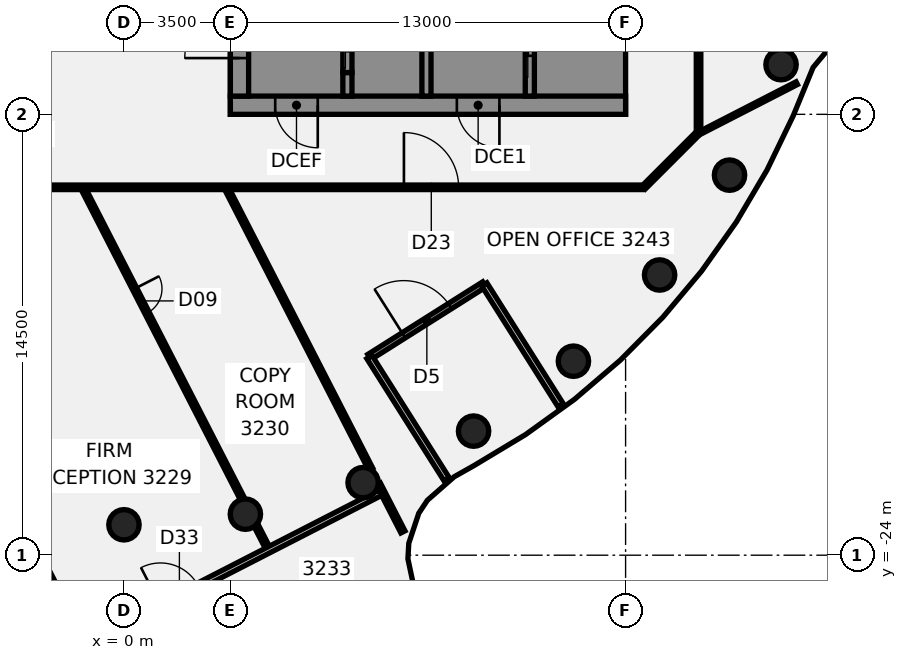
"""IFC4 building model, lengths in metres.
Left out: names, types, materials, properties, quantities, classifications, styles, units other than length and angle.
Written with IfcOpenShell. Run it as: python <this file> out.ifc"""

import sys

from ifc_helpers import new_model, si_unit, direction, frame, frame_2d, origin, origin_2d, place, context, subcontext, project, spatial, polyline, rectangle, circle, outline, extrude, element, fill, save


model = new_model("IFC4")
c1 = context("Model", 3, precision=1e-05, world=origin(), true_north=direction((0.0, 1.0)))
c2 = subcontext(c1, "Body", "Model", "MODEL_VIEW")
j1 = project(units=[si_unit("LENGTHUNIT", "METRE"), si_unit("PLANEANGLEUNIT", "RADIAN")], contexts=[c1])
p1 = place(None, origin())
s1 = spatial("IfcSite", under=j1, at=p1, CompositionType="ELEMENT")
p2 = place(p1, origin())
s2 = spatial("IfcBuilding", under=s1, at=p2, CompositionType="ELEMENT")
p3 = place(p2, frame((0.0, 0.0, 133.0)))
s3 = spatial("IfcBuildingStorey", under=s2, at=p3, CompositionType="ELEMENT", Elevation=133.0)
for number, where, z_axis, x_axis in (
    (1, (0.0, -23.0, -0.14), (0.0, 0.0, 1.0), (1.0, 0.0, 0.0)),
    (2, (3.994, -22.651, -0.14), (0.0, 0.0, 1.0), (1.0, 0.0, 0.0)),
    (3, (7.866, -21.613, -0.14), (0.0, 0.0, 1.0), (1.0, 0.0, 0.0)),
    (4, (11.5, -19.919, -0.14), (0.0, 0.0, 1.0), (1.0, 0.0, 0.0)),
    (5, (14.784, -17.619, -0.14), (0.0, 0.0, 1.0), (1.0, 0.0, 0.0)),
    (6, (17.619, -14.784, -0.14), (0.0, 0.0, 1.0), (1.0, 0.0, 0.0)),
    (7, (19.919, -11.5, -0.14), (0.0, 0.0, 1.0), (1.0, 0.0, 0.0)),
    (8, (21.613, -7.866, -0.14), (0.0, 0.0, 1.0), (1.0, 0.0, 0.0)),
):
    element("IfcColumn", number, at=place(p3, frame(where, z_axis=z_axis, x_axis=x_axis)), inside=s3, PredefinedType="COLUMN", context=c2, shape_type="SweptSolid", body=[
        extrude(circle(Radius=0.5, at=origin_2d()), origin(), (0.0, 0.0, 1.0), 3.75),
    ])
p4 = place(p3, frame((-3.485, -22.655, 0.0), z_axis=(0.0, 0.0, 1.0), x_axis=(0.456522971759, -0.889711625335, 0.0)))
e9 = element("IfcWall", 9, at=p4, inside=s3, PredefinedType="PARTITIONING", context=c2, shape_type="SweptSolid", body=[
    extrude(rectangle(XDim=4.708, YDim=0.15, at=frame_2d((2.354, 0.0))), origin(), (0.0, 0.0, 1.0), 3.01),
])
p5 = place(p3, frame((-1.313, -11.993, 0.0), z_axis=(0.0, 0.0, 1.0), x_axis=(0.456517816725, -0.889714270433, 0.0)))
e10 = element("IfcWall", 10, at=p5, inside=s3, PredefinedType="PARTITIONING", context=c2, shape_type="SweptSolid", body=[
    extrude(rectangle(XDim=11.432, YDim=0.15, at=frame_2d((5.716, 0.0))), origin(), (0.0, 0.0, 1.0), 3.01),
])
p6 = place(p5, frame((3.645, 0.0, 0.0)))
e11 = element("IfcOpeningElement", 11, at=p6, cuts=e10, PredefinedType="OPENING", context=c2, shape_type="SweptSolid", body=[
    extrude(rectangle(XDim=0.9, YDim=2.1, at=frame_2d((0.45, 1.05))), frame((0.0, 0.085, 0.0), z_axis=(0.0, -1.0, 0.0), x_axis=(1.0, 0.0, 0.0)), (0.0, 0.0, 1.0), 0.17),
])
p7 = place(p3, frame((4.337, -23.004, 0.0), z_axis=(0.0, 0.0, 1.0), x_axis=(0.456575953503, -0.889684437698, 0.0)))
e12 = element("IfcWall", 12, at=p7, inside=s3, PredefinedType="PARTITIONING", context=c2, shape_type="SweptSolid", body=[
    extrude(rectangle(XDim=0.822, YDim=0.15, at=frame_2d((0.411, 0.0))), origin(), (0.0, 0.0, 1.0), 3.01),
])
p8 = place(p3, frame((3.407, -11.993, 0.0), z_axis=(0.0, 0.0, 1.0), x_axis=(0.456609270215, -0.889667339152, 0.0)))
e13 = element("IfcWall", 13, at=p8, inside=s3, PredefinedType="PARTITIONING", context=c2, shape_type="SweptSolid", body=[
    extrude(rectangle(XDim=10.314, YDim=0.15, at=frame_2d((5.157, 0.0))), origin(), (0.0, 0.0, 1.0), 3.01),
])
p9 = place(p3, frame((8.365, -21.655, 0.0), z_axis=(0.0, 0.0, 1.0), x_axis=(0.456704681847, -0.889618364007, 0.0)))
e14 = element("IfcWall", 14, at=p9, inside=s3, PredefinedType="PARTITIONING", context=c2, shape_type="SweptSolid", body=[
    extrude(rectangle(XDim=1.775, YDim=0.15, at=frame_2d((0.888, 0.0))), origin(), (0.0, 0.0, 1.0), 3.01),
])
p10 = place(p3, frame((-17.1, -11.9, 0.0), z_axis=(0.0, 0.0, 1.0), x_axis=(1.0, 0.0, 0.0)))
e15 = element("IfcWall", 15, at=p10, inside=s3, PredefinedType="PARTITIONING", context=c2, shape_type="SweptSolid", body=[
    extrude(rectangle(XDim=34.165, YDim=0.15, at=frame_2d((17.083, 0.0))), origin(), (0.0, 0.0, 1.0), 3.01),
])
p11 = place(p10, frame((10.946, 0.0, 0.0)))
e16 = element("IfcOpeningElement", 16, at=p11, cuts=e15, PredefinedType="OPENING", context=c2, shape_type="SweptSolid", body=[
    extrude(rectangle(XDim=1.8, YDim=2.1, at=frame_2d((0.9, 1.05))), frame((0.0, 0.085, 0.0), z_axis=(0.0, -1.0, 0.0), x_axis=(1.0, 0.0, 0.0)), (0.0, 0.0, 1.0), 0.17),
])
p12 = place(p10, frame((1.65, 0.0, 0.0)))
e17 = element("IfcOpeningElement", 17, at=p12, cuts=e15, PredefinedType="OPENING", context=c2, shape_type="SweptSolid", body=[
    extrude(rectangle(XDim=1.8, YDim=2.1, at=frame_2d((0.9, 1.05))), frame((0.0, 0.085, 0.0), z_axis=(0.0, -1.0, 0.0), x_axis=(1.0, 0.0, 0.0)), (0.0, 0.0, 1.0), 0.17),
])
p13 = place(p10, frame((26.309, 0.0, 0.0)))
e18 = element("IfcOpeningElement", 18, at=p13, cuts=e15, PredefinedType="OPENING", context=c2, shape_type="SweptSolid", body=[
    extrude(rectangle(XDim=1.8, YDim=2.1, at=frame_2d((0.9, 1.05))), frame((0.0, 0.085, 0.0), z_axis=(0.0, -1.0, 0.0), x_axis=(1.0, 0.0, 0.0)), (0.0, 0.0, 1.0), 0.17),
])
p14 = place(p3, frame((-4.225, -28.439, 0.0), z_axis=(0.0, 0.0, 1.0), x_axis=(0.889694266908, 0.456556799787, 0.0)))
e19 = element("IfcWall", 19, at=p14, inside=s3, PredefinedType="PARTITIONING", context=c2, shape_type="SweptSolid", body=[
    extrude(rectangle(XDim=14.219, YDim=0.2, at=frame_2d((7.11, 0.0))), origin(), (0.0, 0.0, 1.0), 3.01),
])
p15 = place(p14, frame((6.099, 0.0, 0.0)))
e20 = element("IfcOpeningElement", 20, at=p15, cuts=e19, PredefinedType="OPENING", context=c2, shape_type="SweptSolid", body=[
    extrude(rectangle(XDim=1.4, YDim=2.1, at=frame_2d((0.7, 1.05))), frame((0.0, 0.11, 0.0), z_axis=(0.0, -1.0, 0.0), x_axis=(1.0, 0.0, 0.0)), (0.0, 0.0, 1.0), 0.22),
])
p16 = place(p3, frame((18.93, -10.118, 0.0), z_axis=(0.0, 0.0, 1.0), x_axis=(0.889666890189, 0.456610144984, 0.0)))
e21 = element("IfcWall", 21, at=p16, inside=s3, PredefinedType="PARTITIONING", context=c2, shape_type="SweptSolid", body=[
    extrude(rectangle(XDim=3.597, YDim=0.1, at=frame_2d((1.798, 0.0))), origin(), (0.0, 0.0, 1.0), 3.01),
])
p17 = place(p3, frame((17.1, -11.9, 0.0), z_axis=(0.0, 0.0, 1.0), x_axis=(0.707106781187, 0.707106781187, 0.0)))
e22 = element("IfcWall", 22, at=p17, inside=s3, PredefinedType="PARTITIONING", context=c2, shape_type="SweptSolid", body=[
    extrude(rectangle(XDim=2.505, YDim=0.15, at=frame_2d((1.253, 0.0))), origin(), (0.0, 0.0, 1.0), 3.01),
])
p18 = place(p3, frame((18.9, -10.1, 0.0), z_axis=(0.0, 0.0, 1.0), x_axis=(0.0, 1.0, 0.0)))
e23 = element("IfcWall", 23, at=p18, inside=s3, PredefinedType="PARTITIONING", context=c2, shape_type="SweptSolid", body=[
    extrude(rectangle(XDim=20.2, YDim=0.15, at=frame_2d((10.1, 0.0))), origin(), (0.0, 0.0, 1.0), 3.01),
])
p19 = place(p18, frame((8.438, 0.0, 0.0)))
e24 = element("IfcOpeningElement", 24, at=p19, cuts=e23, PredefinedType="OPENING", context=c2, shape_type="SweptSolid", body=[
    extrude(rectangle(XDim=1.8, YDim=2.1, at=frame_2d((0.9, 1.05))), frame((0.0, 0.085, 0.0), z_axis=(0.0, -1.0, 0.0), x_axis=(1.0, 0.0, 0.0)), (0.0, 0.0, 1.0), 0.17),
])
p20 = place(p18, frame((13.681, 0.0, 0.0)))
e25 = element("IfcOpeningElement", 25, at=p20, cuts=e23, PredefinedType="OPENING", context=c2, shape_type="SweptSolid", body=[
    extrude(rectangle(XDim=0.9, YDim=2.1, at=frame_2d((0.45, 1.05))), frame((0.0, 0.085, 0.0), z_axis=(0.0, -1.0, 0.0), x_axis=(1.0, 0.0, 0.0)), (0.0, 0.0, 1.0), 0.17),
])
p21 = place(p3, frame((8.073, -17.482, 0.0), z_axis=(0.0, 0.0, 1.0), x_axis=(0.845417528595, 0.534105984187, 0.0)))
e26 = element("IfcWall", 26, at=p21, inside=s3, PredefinedType="SOLIDWALL", context=c2, shape_type="SweptSolid", body=[
    extrude(rectangle(XDim=4.471, YDim=0.2, at=frame_2d((2.235, 0.0))), origin(), (0.0, 0.0, 1.0), 3.61),
])
p22 = place(p21, frame((1.335, 0.0, 0.0)))
e27 = element("IfcOpeningElement", 27, at=p22, cuts=e26, PredefinedType="OPENING", context=c2, shape_type="SweptSolid", body=[
    extrude(rectangle(XDim=1.8, YDim=2.4, at=frame_2d((0.9, 1.2))), frame((0.0, 0.11, 0.0), z_axis=(0.0, -1.0, 0.0), x_axis=(1.0, 0.0, 0.0)), (0.0, 0.0, 1.0), 0.22),
])
p23 = place(p3, frame((8.073, -17.482, 0.0), z_axis=(0.0, 0.0, 1.0), x_axis=(0.534101065581, -0.845420635982, 0.0)))
e28 = element("IfcWall", 28, at=p23, inside=s3, PredefinedType="SOLIDWALL", context=c2, shape_type="SweptSolid", body=[
    extrude(rectangle(XDim=4.759, YDim=0.2, at=frame_2d((2.38, 0.0))), origin(), (0.0, 0.0, 1.0), 3.61),
])
p24 = place(p3, frame((11.853, -15.094, 0.0), z_axis=(0.0, 0.0, 1.0), x_axis=(0.534084671669, -0.845430992742, 0.0)))
e29 = element("IfcWall", 29, at=p24, inside=s3, PredefinedType="SOLIDWALL", context=c2, shape_type="SweptSolid", body=[
    extrude(rectangle(XDim=4.709, YDim=0.2, at=frame_2d((2.354, 0.0))), origin(), (0.0, 0.0, 1.0), 3.61),
])
p25 = place(p3, frame((16.5, -9.2, 0.0), z_axis=(0.0, 0.0, 1.0), x_axis=(-1.0, 0.0, 0.0)))
e30 = element("IfcWall", 30, at=p25, inside=s3, PredefinedType="SHEAR", context=c2, shape_type="SweptSolid", body=[
    extrude(rectangle(XDim=13.0, YDim=0.6, at=frame_2d((6.5, 0.0))), origin(), (0.0, 0.0, 1.0), 3.61),
])
p26 = place(p25, frame((4.15, 0.0, 0.0)))
e31 = element("IfcOpeningElement", 31, at=p26, cuts=e30, PredefinedType="OPENING", context=c2, shape_type="SweptSolid", body=[
    extrude(rectangle(XDim=1.4, YDim=2.1, at=frame_2d((0.7, 1.05))), frame((0.0, 0.31, 0.0), z_axis=(0.0, -1.0, 0.0), x_axis=(1.0, 0.0, 0.0)), (0.0, 0.0, 1.0), 0.62),
])
p27 = place(p25, frame((10.125, 0.0, 0.0)))
e32 = element("IfcOpeningElement", 32, at=p27, cuts=e30, PredefinedType="OPENING", context=c2, shape_type="SweptSolid", body=[
    extrude(rectangle(XDim=1.4, YDim=2.1, at=frame_2d((0.7, 1.05))), frame((0.0, 0.31, 0.0), z_axis=(0.0, -1.0, 0.0), x_axis=(1.0, 0.0, 0.0)), (0.0, 0.0, 1.0), 0.62),
])
p28 = place(p3, origin())
e33 = element("IfcWall", 33, at=p28, inside=s3, PredefinedType="SHEAR", context=c2, shape_type="SweptSolid", body=[
    extrude(outline(polyline([(13.5, -8.9), (15.9, -8.9), (16.5, -8.9), (16.5, 8.9), (15.9, 8.9), (13.5, 8.9), (13.5, 8.125), (15.9, 8.125), (15.9, 5.625), (13.5, 5.625), (13.5, 5.375), (15.9, 5.375), (15.9, 2.875), (13.5, 2.875), (13.5, 2.625), (15.9, 2.625), (15.9, 0.125), (13.5, 0.125), (13.5, -0.125), (15.9, -0.125), (15.9, -2.625), (13.5, -2.625), (13.5, -2.875), (15.9, -2.875), (15.9, -5.375), (13.5, -5.375), (13.5, -5.625), (15.9, -5.625), (15.9, -8.125), (13.5, -8.125), (13.5, -8.9)])), origin(), (0.0, 0.0, 1.0), 3.61),
])
p29 = place(p3, origin())
e34 = element("IfcWall", 34, at=p29, inside=s3, PredefinedType="SHEAR", context=c2, shape_type="SweptSolid", body=[
    extrude(outline(polyline([(7.5, -8.125), (7.5, -8.9), (9.8, -8.9), (9.8, -8.125), (9.8, -5.625), (9.55, -5.625), (9.55, -8.125), (7.5, -8.125)])), origin(), (0.0, 0.0, 1.0), 3.61),
])
p30 = place(p3, frame((7.35, -8.9, 0.0), z_axis=(0.0, 0.0, 1.0), x_axis=(0.0, 1.0, 0.0)))
e35 = element("IfcWall", 35, at=p30, inside=s3, PredefinedType="SHEAR", context=c2, shape_type="SweptSolid", body=[
    extrude(rectangle(XDim=0.775, YDim=0.3, at=frame_2d((0.387, 0.0))), origin(), (0.0, 0.0, 1.0), 3.61),
])
p31 = place(p3, frame((13.35, -8.9, 0.0), z_axis=(0.0, 0.0, 1.0), x_axis=(0.0, 1.0, 0.0)))
e36 = element("IfcWall", 36, at=p31, inside=s3, PredefinedType="SHEAR", context=c2, shape_type="SweptSolid", body=[
    extrude(rectangle(XDim=17.8, YDim=0.3, at=frame_2d((8.9, 0.0))), origin(), (0.0, 0.0, 1.0), 3.61),
])
p32 = place(p31, frame((1.325, 0.0, 0.0)))
e37 = element("IfcOpeningElement", 37, at=p32, cuts=e36, PredefinedType="OPENING", context=c2, shape_type="SweptSolid", body=[
    extrude(rectangle(XDim=1.4, YDim=2.1, at=frame_2d((0.7, 1.05))), frame((0.0, 0.16, 0.0), z_axis=(0.0, -1.0, 0.0), x_axis=(1.0, 0.0, 0.0)), (0.0, 0.0, 1.0), 0.32),
])
p33 = place(p3, frame((9.95, -8.9, 0.0), z_axis=(0.0, 0.0, 1.0), x_axis=(0.0, 1.0, 0.0)))
e38 = element("IfcWall", 38, at=p33, inside=s3, PredefinedType="SHEAR", context=c2, shape_type="SweptSolid", body=[
    extrude(rectangle(XDim=17.8, YDim=0.3, at=frame_2d((8.9, 0.0))), origin(), (0.0, 0.0, 1.0), 3.61),
])
p34 = place(p33, frame((4.175, 0.0, 0.0)))
e39 = element("IfcOpeningElement", 39, at=p34, cuts=e38, PredefinedType="OPENING", context=c2, shape_type="SweptSolid", body=[
    extrude(rectangle(XDim=1.2, YDim=2.1, at=frame_2d((0.6, 1.05))), frame((0.0, 0.16, 0.0), z_axis=(0.0, -1.0, 0.0), x_axis=(1.0, 0.0, 0.0)), (0.0, 0.0, 1.0), 0.32),
])
p35 = place(p33, frame((6.925, 0.0, 0.0)))
e40 = element("IfcOpeningElement", 40, at=p35, cuts=e38, PredefinedType="OPENING", context=c2, shape_type="SweptSolid", body=[
    extrude(rectangle(XDim=1.2, YDim=2.1, at=frame_2d((0.6, 1.05))), frame((0.0, 0.16, 0.0), z_axis=(0.0, -1.0, 0.0), x_axis=(1.0, 0.0, 0.0)), (0.0, 0.0, 1.0), 0.32),
])
p36 = place(p3, frame((7.35, -8.125, 0.0), z_axis=(0.0, 0.0, 1.0), x_axis=(0.0, 1.0, 0.0)))
e41 = element("IfcWall", 41, at=p36, inside=s3, PredefinedType="SHEAR", context=c2, shape_type="SweptSolid", body=[
    extrude(rectangle(XDim=2.5, YDim=0.3, at=frame_2d((1.25, 0.0))), origin(), (0.0, 0.0, 1.0), 3.61),
])
p37 = place(p36, frame((0.7, 0.0, 0.0)))
e42 = element("IfcOpeningElement", 42, at=p37, cuts=e41, PredefinedType="OPENING", context=c2, shape_type="SweptSolid", body=[
    extrude(rectangle(XDim=1.1, YDim=2.1, at=frame_2d((0.55, 1.05))), frame((0.0, 0.16, 0.0), z_axis=(0.0, -1.0, 0.0), x_axis=(1.0, 0.0, 0.0)), (0.0, 0.0, 1.0), 0.32),
])
p38 = place(p3, frame((3.8, -8.9, 0.0), z_axis=(0.0, 0.0, 1.0), x_axis=(0.0, 1.0, 0.0)))
e43 = element("IfcWall", 43, at=p38, inside=s3, PredefinedType="SHEAR", context=c2, shape_type="SweptSolid", body=[
    extrude(rectangle(XDim=17.8, YDim=0.6, at=frame_2d((8.9, 0.0))), origin(), (0.0, 0.0, 1.0), 3.61),
])
p39 = place(p38, frame((1.25, 0.0, 0.0)))
e44 = element("IfcOpeningElement", 44, at=p39, cuts=e43, PredefinedType="OPENING", context=c2, shape_type="SweptSolid", body=[
    extrude(rectangle(XDim=1.8, YDim=2.1, at=frame_2d((0.9, 1.05))), frame((0.0, 0.31, 0.0), z_axis=(0.0, -1.0, 0.0), x_axis=(1.0, 0.0, 0.0)), (0.0, 0.0, 1.0), 0.62),
])
p40 = place(p38, frame((13.8, 0.0, 0.0)))
e45 = element("IfcOpeningElement", 45, at=p40, cuts=e43, PredefinedType="OPENING", context=c2, shape_type="SweptSolid", body=[
    extrude(rectangle(XDim=1.0, YDim=2.1, at=frame_2d((0.5, 1.05))), frame((0.0, 0.31, 0.0), z_axis=(0.0, -1.0, 0.0), x_axis=(1.0, 0.0, 0.0)), (0.0, 0.0, 1.0), 0.62),
])
p41 = place(p6, origin())
e46 = element("IfcDoor", 46, at=p41, inside=s3, OperationType="SINGLE_SWING_RIGHT", PredefinedType="DOOR", context=c2, shape_type="SweptSolid", body=[
    extrude(rectangle(XDim=0.9, YDim=2.1, at=frame_2d((0.45, 1.05))), frame((0.0, 0.025, 0.0), z_axis=(0.0, -1.0, 0.0), x_axis=(1.0, 0.0, 0.0)), (0.0, 0.0, 1.0), 0.05),
])
fill(e11, e46)
p42 = place(p13, frame((1.8, 0.0, 0.0), z_axis=(0.0, 0.0, 1.0), x_axis=(-1.0, 0.0, 0.0)))
e47 = element("IfcDoor", 47, at=p42, inside=s3, OperationType="DOUBLE_DOOR_SINGLE_SWING", PredefinedType="DOOR", context=c2, shape_type="SweptSolid", body=[
    extrude(rectangle(XDim=1.8, YDim=2.1, at=frame_2d((0.9, 1.05))), frame((0.0, 0.025, 0.0), z_axis=(0.0, -1.0, 0.0), x_axis=(1.0, 0.0, 0.0)), (0.0, 0.0, 1.0), 0.05),
])
fill(e18, e47)
p43 = place(p22, origin())
e48 = element("IfcDoor", 48, at=p43, inside=s3, OperationType="SINGLE_SWING_LEFT", PredefinedType="DOOR", context=c2, shape_type="SweptSolid", body=[
    extrude(rectangle(XDim=1.8, YDim=2.4, at=frame_2d((0.9, 1.2))), frame((0.0, 0.025, 0.0), z_axis=(0.0, -1.0, 0.0), x_axis=(1.0, 0.0, 0.0)), (0.0, 0.0, 1.0), 0.05),
])
fill(e27, e48)
p44 = place(p26, origin())
e49 = element("IfcDoor", 49, at=p44, inside=s3, OperationType="SINGLE_SWING_LEFT", PredefinedType="DOOR", context=c2, shape_type="SweptSolid", body=[
    extrude(rectangle(XDim=1.4, YDim=2.1, at=frame_2d((0.7, 1.05))), frame((0.0, 0.025, 0.0), z_axis=(0.0, -1.0, 0.0), x_axis=(1.0, 0.0, 0.0)), (0.0, 0.0, 1.0), 0.05),
])
fill(e31, e49)
p45 = place(p27, origin())
e50 = element("IfcDoor", 50, at=p45, inside=s3, OperationType="SINGLE_SWING_LEFT", PredefinedType="DOOR", context=c2, shape_type="SweptSolid", body=[
    extrude(rectangle(XDim=1.4, YDim=2.1, at=frame_2d((0.7, 1.05))), frame((0.0, 0.025, 0.0), z_axis=(0.0, -1.0, 0.0), x_axis=(1.0, 0.0, 0.0)), (0.0, 0.0, 1.0), 0.05),
])
fill(e32, e50)
p46 = place(p39, origin())
e51 = element("IfcDoor", 51, at=p46, inside=s3, OperationType="SINGLE_SWING_LEFT", PredefinedType="DOOR", context=c2, shape_type="SweptSolid", body=[
    extrude(rectangle(XDim=1.8, YDim=2.1, at=frame_2d((0.9, 1.05))), frame((0.0, 0.025, 0.0), z_axis=(0.0, -1.0, 0.0), x_axis=(1.0, 0.0, 0.0)), (0.0, 0.0, 1.0), 0.05),
])
fill(e44, e51)
p47 = place(p32, origin())
e52 = element("IfcDoor", 52, at=p47, inside=s3, OperationType="SLIDING_TO_LEFT", PredefinedType="DOOR", context=c2, shape_type="SweptSolid", body=[
    extrude(rectangle(XDim=1.4, YDim=2.1, at=frame_2d((0.7, 1.05))), frame((0.0, 0.025, 0.0), z_axis=(0.0, -1.0, 0.0), x_axis=(1.0, 0.0, 0.0)), (0.0, 0.0, 1.0), 0.05),
])
fill(e37, e52)
save(model, sys.argv[1])
